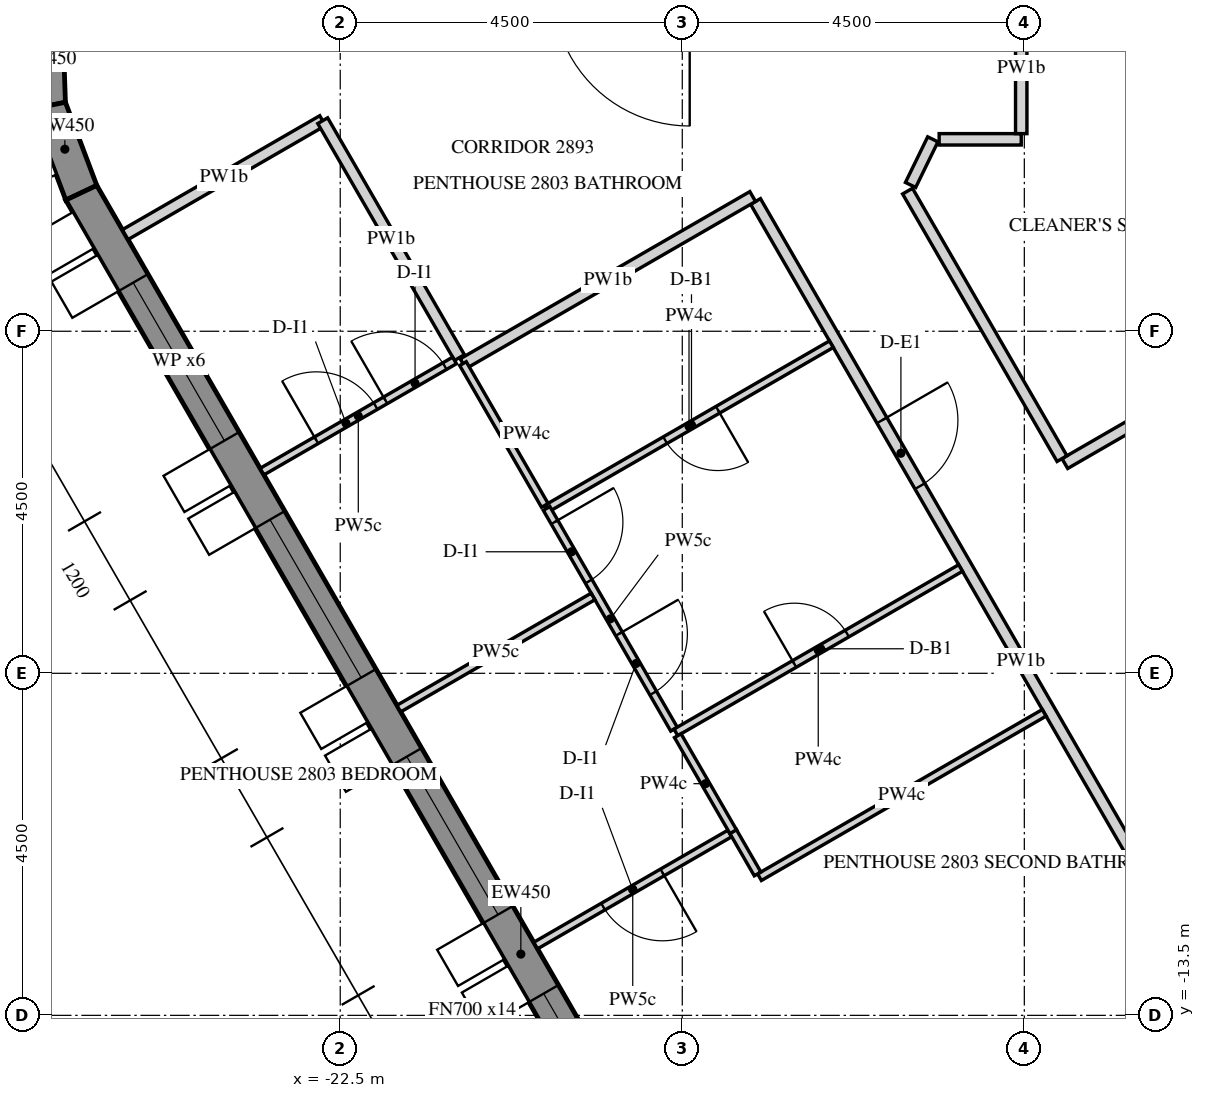
"""IFC4 building model, lengths in metres.
Left out: names, types, materials, properties, quantities, classifications, styles, units other than length and angle.
Written with IfcOpenShell. Run it as: python <this file> out.ifc"""

import sys

from ifc_helpers import new_model, si_unit, direction, frame, frame_2d, origin, place, context, subcontext, project, spatial, polyline, rectangle, outline, extrude, element, fill, save


model = new_model("IFC4")
c1 = context("Model", 3, precision=1e-05, world=origin(), true_north=direction((0.0, 1.0)))
c2 = subcontext(c1, "Body", "Model", "MODEL_VIEW")
j1 = project(units=[si_unit("LENGTHUNIT", "METRE"), si_unit("PLANEANGLEUNIT", "RADIAN")], contexts=[c1])
p1 = place(None, origin())
s1 = spatial("IfcSite", under=j1, at=p1, CompositionType="ELEMENT")
p2 = place(p1, origin())
s2 = spatial("IfcBuilding", under=s1, at=p2, CompositionType="ELEMENT")
p3 = place(p2, frame((0.0, 0.0, 361.2)))
s3 = spatial("IfcBuildingStorey", under=s2, at=p3, CompositionType="ELEMENT", Elevation=361.2)
p4 = place(p3, frame((-26.382, -0.309, -0.15), z_axis=(0.0, 0.0, 1.0), x_axis=(0.034887984255, -0.999391228976, 0.0)))
e1 = element("IfcWall", 1, at=p4, inside=s3, PredefinedType="SOLIDWALL", context=c2, shape_type="SweptSolid", body=[
    extrude(outline(polyline([(-0.037, -0.225), (1.261, -0.225), (1.188, 0.225), (0.037, 0.225), (-0.037, -0.225)])), origin(), (0.0, 0.0, 1.0), 3.9),
])
p5 = place(p3, frame((-26.339, -1.532, -0.15), z_axis=(0.0, 0.0, 1.0), x_axis=(0.353132996235, -0.935573132882, 0.0)))
e2 = element("IfcWall", 2, at=p5, inside=s3, PredefinedType="SOLIDWALL", context=c2, shape_type="SweptSolid", body=[
    extrude(outline(polyline([(-0.037, -0.225), (1.243, -0.225), (1.206, 0.225), (0.037, 0.225), (-0.037, -0.225)])), origin(), (0.0, 0.0, 1.0), 3.9),
])
p6 = place(p3, frame((-25.907, -2.678, -0.15), z_axis=(0.0, 0.0, 1.0), x_axis=(0.499997453958, -0.866026873738, 0.0)))
e3 = element("IfcWall", 3, at=p6, inside=s3, PredefinedType="SOLIDWALL", context=c2, shape_type="SweptSolid", body=[
    extrude(outline(polyline([(-0.018, -0.225), (23.152, -0.225), (23.11, 0.225), (0.018, 0.225), (-0.018, -0.225)])), origin(), (0.0, 0.0, 1.0), 3.9),
])
p7 = place(p6, frame((1.366, 0.0, 0.45)))
e4 = element("IfcOpeningElement", 4, at=p7, cuts=e3, PredefinedType="OPENING", context=c2, shape_type="SweptSolid", body=[
    extrude(rectangle(XDim=2.4, YDim=3.0, at=frame_2d((1.2, 1.5))), frame((0.0, 0.235, 0.0), z_axis=(0.0, -1.0, 0.0), x_axis=(1.0, 0.0, 0.0)), (0.0, 0.0, 1.0), 0.47),
])
p8 = place(p6, frame((4.966, 0.0, 0.45)))
e5 = element("IfcOpeningElement", 5, at=p8, cuts=e3, PredefinedType="OPENING", context=c2, shape_type="SweptSolid", body=[
    extrude(rectangle(XDim=2.4, YDim=3.0, at=frame_2d((1.2, 1.5))), frame((0.0, 0.235, 0.0), z_axis=(0.0, -1.0, 0.0), x_axis=(1.0, 0.0, 0.0)), (0.0, 0.0, 1.0), 0.47),
])
p9 = place(p6, frame((8.566, 0.0, 0.45)))
e6 = element("IfcOpeningElement", 6, at=p9, cuts=e3, PredefinedType="OPENING", context=c2, shape_type="SweptSolid", body=[
    extrude(rectangle(XDim=2.4, YDim=3.0, at=frame_2d((1.2, 1.5))), frame((0.0, 0.235, 0.0), z_axis=(0.0, -1.0, 0.0), x_axis=(1.0, 0.0, 0.0)), (0.0, 0.0, 1.0), 0.47),
])
p10 = place(p6, frame((12.166, 0.0, 0.45)))
e7 = element("IfcOpeningElement", 7, at=p10, cuts=e3, PredefinedType="OPENING", context=c2, shape_type="SweptSolid", body=[
    extrude(rectangle(XDim=2.4, YDim=3.0, at=frame_2d((1.2, 1.5))), frame((0.0, 0.235, 0.0), z_axis=(0.0, -1.0, 0.0), x_axis=(1.0, 0.0, 0.0)), (0.0, 0.0, 1.0), 0.47),
])
p11 = place(p6, frame((15.766, 0.0, 0.45)))
e8 = element("IfcOpeningElement", 8, at=p11, cuts=e3, PredefinedType="OPENING", context=c2, shape_type="SweptSolid", body=[
    extrude(rectangle(XDim=2.4, YDim=3.0, at=frame_2d((1.2, 1.5))), frame((0.0, 0.235, 0.0), z_axis=(0.0, -1.0, 0.0), x_axis=(1.0, 0.0, 0.0)), (0.0, 0.0, 1.0), 0.47),
])
p12 = place(p6, frame((19.366, 0.0, 0.45)))
e9 = element("IfcOpeningElement", 9, at=p12, cuts=e3, PredefinedType="OPENING", context=c2, shape_type="SweptSolid", body=[
    extrude(rectangle(XDim=2.4, YDim=3.0, at=frame_2d((1.2, 1.5))), frame((0.0, 0.235, 0.0), z_axis=(0.0, -1.0, 0.0), x_axis=(1.0, 0.0, 0.0)), (0.0, 0.0, 1.0), 0.47),
])
p13 = place(p3, frame((-17.036, -2.792, 0.0), z_axis=(0.0, 0.0, 1.0), x_axis=(0.500006428338, -0.86602169235, 0.0)))
e10 = element("IfcWall", 10, at=p13, inside=s3, PredefinedType="PARTITIONING", context=c2, shape_type="SweptSolid", body=[
    extrude(rectangle(XDim=13.966, YDim=0.15, at=frame_2d((6.983, 0.0))), origin(), (0.0, 0.0, 1.0), 2.82),
])
p14 = place(p13, frame((3.325, 0.0, 0.0)))
e11 = element("IfcOpeningElement", 11, at=p14, cuts=e10, PredefinedType="OPENING", context=c2, shape_type="SweptSolid", body=[
    extrude(rectangle(XDim=1.0, YDim=2.1, at=frame_2d((0.5, 1.05))), frame((0.0, 0.085, 0.0), z_axis=(0.0, -1.0, 0.0), x_axis=(1.0, 0.0, 0.0)), (0.0, 0.0, 1.0), 0.17),
])
p15 = place(p3, frame((-20.884, -4.927, 0.0), z_axis=(0.0, 0.0, 1.0), x_axis=(0.866032203192, 0.499988222896, 0.0)))
e12 = element("IfcWall", 12, at=p15, inside=s3, PredefinedType="PARTITIONING", context=c2, shape_type="SweptSolid", body=[
    extrude(rectangle(XDim=4.4, YDim=0.15, at=frame_2d((2.2, 0.0))), origin(), (0.0, 0.0, 1.0), 2.82),
])
p16 = place(p3, frame((-25.329, -3.229, 0.0), z_axis=(0.0, 0.0, 1.0), x_axis=(0.865999837459, 0.50004427956, 0.0)))
e13 = element("IfcWall", 13, at=p16, inside=s3, PredefinedType="PARTITIONING", context=c2, shape_type="SweptSolid", body=[
    extrude(rectangle(XDim=2.999, YDim=0.15, at=frame_2d((1.5, 0.0))), origin(), (0.0, 0.0, 1.0), 2.82),
])
p17 = place(p3, frame((-22.73, -1.73, 0.0), z_axis=(0.0, 0.0, 1.0), x_axis=(0.500027802648, -0.866009351323, 0.0)))
e14 = element("IfcWall", 14, at=p17, inside=s3, PredefinedType="PARTITIONING", context=c2, shape_type="SweptSolid", body=[
    extrude(rectangle(XDim=3.599, YDim=0.15, at=frame_2d((1.799, 0.0))), origin(), (0.0, 0.0, 1.0), 2.82),
])
p18 = place(p3, frame((-9.2, -4.066, 0.0), z_axis=(0.0, 0.0, 1.0), x_axis=(-0.866013608182, -0.500020430026, 0.0)))
e15 = element("IfcWall", 15, at=p18, inside=s3, PredefinedType="PARTITIONING", context=c2, shape_type="SweptSolid", body=[
    extrude(rectangle(XDim=4.35, YDim=0.15, at=frame_2d((2.175, 0.0))), origin(), (0.0, 0.0, 1.0), 2.82),
])
p19 = place(p18, frame((1.725, 0.0, 0.0)))
e16 = element("IfcOpeningElement", 16, at=p19, cuts=e15, PredefinedType="OPENING", context=c2, shape_type="SweptSolid", body=[
    extrude(rectangle(XDim=0.9, YDim=2.1, at=frame_2d((0.45, 1.05))), frame((0.0, 0.085, 0.0), z_axis=(0.0, -1.0, 0.0), x_axis=(1.0, 0.0, 0.0)), (0.0, 0.0, 1.0), 0.17),
])
p20 = place(p3, frame((-13.004, -6.176, 0.0), z_axis=(0.0, 0.0, 1.0), x_axis=(-0.500022342669, 0.866012503854, 0.0)))
e17 = element("IfcWall", 17, at=p20, inside=s3, PredefinedType="PARTITIONING", context=c2, shape_type="SweptSolid", body=[
    extrude(rectangle(XDim=4.064, YDim=0.15, at=frame_2d((2.032, 0.0))), origin(), (0.0, 0.0, 1.0), 2.82),
])
p21 = place(p3, frame((-14.997, -2.575, 0.0), z_axis=(0.0, 0.0, 1.0), x_axis=(0.438416427913, 0.898771959808, 0.0)))
e18 = element("IfcWall", 18, at=p21, inside=s3, PredefinedType="PARTITIONING", context=c2, shape_type="SweptSolid", body=[
    extrude(rectangle(XDim=0.668, YDim=0.15, at=frame_2d((0.334, 0.0))), origin(), (0.0, 0.0, 1.0), 2.82),
])
p22 = place(p3, frame((-14.62, -1.975, 0.0), z_axis=(0.0, 0.0, 1.0), x_axis=(1.0, 0.0, 0.0)))
e19 = element("IfcWall", 19, at=p22, inside=s3, PredefinedType="PARTITIONING", context=c2, shape_type="SweptSolid", body=[
    extrude(rectangle(XDim=1.08, YDim=0.15, at=frame_2d((0.54, 0.0))), origin(), (0.0, 0.0, 1.0), 2.82),
])
p23 = place(p3, frame((-13.541, -1.9, 0.0), z_axis=(0.0, 0.0, 1.0), x_axis=(0.0, 1.0, 0.0)))
e20 = element("IfcWall", 20, at=p23, inside=s3, PredefinedType="PARTITIONING", context=c2, shape_type="SweptSolid", body=[
    extrude(rectangle(XDim=1.725, YDim=0.15, at=frame_2d((0.862, 0.0))), origin(), (0.0, 0.0, 1.0), 2.82),
])
p24 = place(p3, frame((-17.374, -11.107, 0.0), z_axis=(0.0, 0.0, 1.0), x_axis=(-0.866024349092, -0.500001826776, 0.0)))
e21 = element("IfcWall", 21, at=p24, inside=s3, PredefinedType="PARTITIONING", context=c2, shape_type="SweptSolid", body=[
    extrude(rectangle(XDim=2.95, YDim=0.1, at=frame_2d((1.475, 0.0))), origin(), (0.0, 0.0, 1.0), 2.82),
])
p25 = place(p24, frame((1.025, 0.0, 0.0)))
e22 = element("IfcOpeningElement", 22, at=p25, cuts=e21, PredefinedType="OPENING", context=c2, shape_type="SweptSolid", body=[
    extrude(rectangle(XDim=0.9, YDim=2.1, at=frame_2d((0.45, 1.05))), frame((0.0, 0.06, 0.0), z_axis=(0.0, -1.0, 0.0), x_axis=(1.0, 0.0, 0.0)), (0.0, 0.0, 1.0), 0.12),
])
p26 = place(p3, frame((-13.239, -9.52, 0.0), z_axis=(0.0, 0.0, 1.0), x_axis=(-0.866018262327, -0.500012369163, 0.0)))
e23 = element("IfcWall", 23, at=p26, inside=s3, PredefinedType="PARTITIONING", context=c2, shape_type="SweptSolid", body=[
    extrude(rectangle(XDim=4.325, YDim=0.1, at=frame_2d((2.163, 0.0))), origin(), (0.0, 0.0, 1.0), 2.82),
])
p27 = place(p3, frame((-17.009, -11.639, 0.0), z_axis=(0.0, 0.0, 1.0), x_axis=(-0.499962526042, 0.866047038303, 0.0)))
e24 = element("IfcWall", 24, at=p27, inside=s3, PredefinedType="PARTITIONING", context=c2, shape_type="SweptSolid", body=[
    extrude(rectangle(XDim=0.646, YDim=0.1, at=frame_2d((0.323, 0.0))), origin(), (0.0, 0.0, 1.0), 2.82),
])
p28 = place(p3, frame((-16.039, -4.67, 0.0), z_axis=(0.0, 0.0, 1.0), x_axis=(-0.86604270489, -0.499970032409, 0.0)))
e25 = element("IfcWall", 25, at=p28, inside=s3, PredefinedType="PARTITIONING", context=c2, shape_type="SweptSolid", body=[
    extrude(rectangle(XDim=4.325, YDim=0.1, at=frame_2d((2.163, 0.0))), origin(), (0.0, 0.0, 1.0), 2.82),
])
p29 = place(p28, frame((1.725, 0.0, 0.0)))
e26 = element("IfcOpeningElement", 26, at=p29, cuts=e25, PredefinedType="OPENING", context=c2, shape_type="SweptSolid", body=[
    extrude(rectangle(XDim=0.8, YDim=2.1, at=frame_2d((0.4, 1.05))), frame((0.0, 0.06, 0.0), z_axis=(0.0, -1.0, 0.0), x_axis=(1.0, 0.0, 0.0)), (0.0, 0.0, 1.0), 0.12),
])
p30 = place(p3, frame((-19.785, -6.831, 0.0), z_axis=(0.0, 0.0, 1.0), x_axis=(0.499982885398, -0.866035284679, 0.0)))
e27 = element("IfcWall", 27, at=p30, inside=s3, PredefinedType="PARTITIONING", context=c2, shape_type="SweptSolid", body=[
    extrude(rectangle(XDim=3.354, YDim=0.1, at=frame_2d((1.677, 0.0))), origin(), (0.0, 0.0, 1.0), 2.82),
])
p31 = place(p30, frame((0.208, 0.0, 0.0)))
e28 = element("IfcOpeningElement", 28, at=p31, cuts=e27, PredefinedType="OPENING", context=c2, shape_type="SweptSolid", body=[
    extrude(rectangle(XDim=0.9, YDim=2.1, at=frame_2d((0.45, 1.05))), frame((0.0, 0.06, 0.0), z_axis=(0.0, -1.0, 0.0), x_axis=(1.0, 0.0, 0.0)), (0.0, 0.0, 1.0), 0.12),
])
p32 = place(p30, frame((1.905, 0.0, 0.0)))
e29 = element("IfcOpeningElement", 29, at=p32, cuts=e27, PredefinedType="OPENING", context=c2, shape_type="SweptSolid", body=[
    extrude(rectangle(XDim=0.9, YDim=2.1, at=frame_2d((0.45, 1.05))), frame((0.0, 0.06, 0.0), z_axis=(0.0, -1.0, 0.0), x_axis=(1.0, 0.0, 0.0)), (0.0, 0.0, 1.0), 0.12),
])
p33 = place(p3, frame((-18.084, -9.777, 0.0), z_axis=(0.0, 0.0, 1.0), x_axis=(0.866018262327, 0.500012369163, 0.0)))
e30 = element("IfcWall", 30, at=p33, inside=s3, PredefinedType="PARTITIONING", context=c2, shape_type="SweptSolid", body=[
    extrude(rectangle(XDim=4.325, YDim=0.1, at=frame_2d((2.163, 0.0))), origin(), (0.0, 0.0, 1.0), 2.82),
])
p34 = place(p33, frame((1.8, 0.0, 0.0)))
e31 = element("IfcOpeningElement", 31, at=p34, cuts=e30, PredefinedType="OPENING", context=c2, shape_type="SweptSolid", body=[
    extrude(rectangle(XDim=0.8, YDim=2.1, at=frame_2d((0.4, 1.05))), frame((0.0, 0.06, 0.0), z_axis=(0.0, -1.0, 0.0), x_axis=(1.0, 0.0, 0.0)), (0.0, 0.0, 1.0), 0.12),
])
p35 = place(p3, frame((-20.885, -4.926, 0.0), z_axis=(0.0, 0.0, 1.0), x_axis=(0.500039660922, -0.86600250433, 0.0)))
e32 = element("IfcWall", 32, at=p35, inside=s3, PredefinedType="PARTITIONING", context=c2, shape_type="SweptSolid", body=[
    extrude(rectangle(XDim=2.154, YDim=0.1, at=frame_2d((1.077, 0.0))), origin(), (0.0, 0.0, 1.0), 2.82),
])
p36 = place(p3, frame((-23.529, -6.346, 0.0), z_axis=(0.0, 0.0, 1.0), x_axis=(0.866025730634, 0.499999433879, 0.0)))
e33 = element("IfcWall", 33, at=p36, inside=s3, PredefinedType="PARTITIONING", context=c2, shape_type="SweptSolid", body=[
    extrude(rectangle(XDim=2.925, YDim=0.1, at=frame_2d((1.462, 0.0))), origin(), (0.0, 0.0, 1.0), 2.82),
])
p37 = place(p36, frame((1.875, 0.0, 0.0)))
e34 = element("IfcOpeningElement", 34, at=p37, cuts=e33, PredefinedType="OPENING", context=c2, shape_type="SweptSolid", body=[
    extrude(rectangle(XDim=0.9, YDim=2.1, at=frame_2d((0.45, 1.05))), frame((0.0, 0.06, 0.0), z_axis=(0.0, -1.0, 0.0), x_axis=(1.0, 0.0, 0.0)), (0.0, 0.0, 1.0), 0.12),
])
p38 = place(p36, frame((0.825, 0.0, 0.0)))
e35 = element("IfcOpeningElement", 35, at=p38, cuts=e33, PredefinedType="OPENING", context=c2, shape_type="SweptSolid", body=[
    extrude(rectangle(XDim=0.9, YDim=2.1, at=frame_2d((0.45, 1.05))), frame((0.0, 0.06, 0.0), z_axis=(0.0, -1.0, 0.0), x_axis=(1.0, 0.0, 0.0)), (0.0, 0.0, 1.0), 0.12),
])
p39 = place(p3, frame((-21.729, -9.464, 0.0), z_axis=(0.0, 0.0, 1.0), x_axis=(0.866003658127, 0.500037662692, 0.0)))
e36 = element("IfcWall", 36, at=p39, inside=s3, PredefinedType="PARTITIONING", context=c2, shape_type="SweptSolid", body=[
    extrude(rectangle(XDim=2.95, YDim=0.1, at=frame_2d((1.475, 0.0))), origin(), (0.0, 0.0, 1.0), 2.82),
])
p40 = place(p3, frame((-17.33, -11.083, 0.0), z_axis=(0.0, 0.0, 1.0), x_axis=(-0.499920521767, 0.866071285701, 0.0)))
e37 = element("IfcWall", 37, at=p40, inside=s3, PredefinedType="PARTITIONING", context=c2, shape_type="SweptSolid", body=[
    extrude(rectangle(XDim=1.458, YDim=0.1, at=frame_2d((0.729, 0.0))), origin(), (0.0, 0.0, 1.0), 2.82),
])
p41 = place(p7, frame((0.0, 0.155, 0.0)))
e38 = element("IfcWindow", 38, at=p41, inside=s3, PartitioningType="DOUBLE_PANEL_VERTICAL", PredefinedType="WINDOW", context=c2, shape_type="SweptSolid", body=[
    extrude(rectangle(XDim=2.4, YDim=3.0, at=frame_2d((1.2, 1.5))), frame((0.0, 0.03, 0.0), z_axis=(0.0, -1.0, 0.0), x_axis=(1.0, 0.0, 0.0)), (0.0, 0.0, 1.0), 0.06),
])
fill(e4, e38)
p42 = place(p8, frame((0.0, 0.155, 0.0)))
e39 = element("IfcWindow", 39, at=p42, inside=s3, PartitioningType="DOUBLE_PANEL_VERTICAL", PredefinedType="WINDOW", context=c2, shape_type="SweptSolid", body=[
    extrude(rectangle(XDim=2.4, YDim=3.0, at=frame_2d((1.2, 1.5))), frame((0.0, 0.03, 0.0), z_axis=(0.0, -1.0, 0.0), x_axis=(1.0, 0.0, 0.0)), (0.0, 0.0, 1.0), 0.06),
])
fill(e5, e39)
p43 = place(p9, frame((0.0, 0.155, 0.0)))
e40 = element("IfcWindow", 40, at=p43, inside=s3, PartitioningType="DOUBLE_PANEL_VERTICAL", PredefinedType="WINDOW", context=c2, shape_type="SweptSolid", body=[
    extrude(rectangle(XDim=2.4, YDim=3.0, at=frame_2d((1.2, 1.5))), frame((0.0, 0.03, 0.0), z_axis=(0.0, -1.0, 0.0), x_axis=(1.0, 0.0, 0.0)), (0.0, 0.0, 1.0), 0.06),
])
fill(e6, e40)
p44 = place(p10, frame((0.0, 0.155, 0.0)))
e41 = element("IfcWindow", 41, at=p44, inside=s3, PartitioningType="DOUBLE_PANEL_VERTICAL", PredefinedType="WINDOW", context=c2, shape_type="SweptSolid", body=[
    extrude(rectangle(XDim=2.4, YDim=3.0, at=frame_2d((1.2, 1.5))), frame((0.0, 0.03, 0.0), z_axis=(0.0, -1.0, 0.0), x_axis=(1.0, 0.0, 0.0)), (0.0, 0.0, 1.0), 0.06),
])
fill(e7, e41)
p45 = place(p14, origin())
e42 = element("IfcDoor", 42, at=p45, inside=s3, OperationType="SINGLE_SWING_RIGHT", PredefinedType="DOOR", context=c2, shape_type="SweptSolid", body=[
    extrude(rectangle(XDim=1.0, YDim=2.1, at=frame_2d((0.5, 1.05))), frame((0.0, 0.025, 0.0), z_axis=(0.0, -1.0, 0.0), x_axis=(1.0, 0.0, 0.0)), (0.0, 0.0, 1.0), 0.05),
])
fill(e11, e42)
p46 = place(p29, origin())
e43 = element("IfcDoor", 43, at=p46, inside=s3, OperationType="SINGLE_SWING_RIGHT", PredefinedType="DOOR", context=c2, shape_type="SweptSolid", body=[
    extrude(rectangle(XDim=0.8, YDim=2.1, at=frame_2d((0.4, 1.05))), frame((0.0, 0.025, 0.0), z_axis=(0.0, -1.0, 0.0), x_axis=(1.0, 0.0, 0.0)), (0.0, 0.0, 1.0), 0.05),
])
fill(e26, e43)
p47 = place(p31, origin())
e44 = element("IfcDoor", 44, at=p47, inside=s3, OperationType="SINGLE_SWING_LEFT", PredefinedType="DOOR", context=c2, shape_type="SweptSolid", body=[
    extrude(rectangle(XDim=0.9, YDim=2.1, at=frame_2d((0.45, 1.05))), frame((0.0, 0.025, 0.0), z_axis=(0.0, -1.0, 0.0), x_axis=(1.0, 0.0, 0.0)), (0.0, 0.0, 1.0), 0.05),
])
fill(e28, e44)
p48 = place(p37, origin())
e45 = element("IfcDoor", 45, at=p48, inside=s3, OperationType="SINGLE_SWING_RIGHT", PredefinedType="DOOR", context=c2, shape_type="SweptSolid", body=[
    extrude(rectangle(XDim=0.9, YDim=2.1, at=frame_2d((0.45, 1.05))), frame((0.0, 0.025, 0.0), z_axis=(0.0, -1.0, 0.0), x_axis=(1.0, 0.0, 0.0)), (0.0, 0.0, 1.0), 0.05),
])
fill(e34, e45)
p49 = place(p38, origin())
e46 = element("IfcDoor", 46, at=p49, inside=s3, OperationType="SINGLE_SWING_RIGHT", PredefinedType="DOOR", context=c2, shape_type="SweptSolid", body=[
    extrude(rectangle(XDim=0.9, YDim=2.1, at=frame_2d((0.45, 1.05))), frame((0.0, 0.025, 0.0), z_axis=(0.0, -1.0, 0.0), x_axis=(1.0, 0.0, 0.0)), (0.0, 0.0, 1.0), 0.05),
])
fill(e35, e46)
p50 = place(p32, origin())
e47 = element("IfcDoor", 47, at=p50, inside=s3, OperationType="SINGLE_SWING_RIGHT", PredefinedType="DOOR", context=c2, shape_type="SweptSolid", body=[
    extrude(rectangle(XDim=0.9, YDim=2.1, at=frame_2d((0.45, 1.05))), frame((0.0, 0.025, 0.0), z_axis=(0.0, -1.0, 0.0), x_axis=(1.0, 0.0, 0.0)), (0.0, 0.0, 1.0), 0.05),
])
fill(e29, e47)
p51 = place(p34, origin())
e48 = element("IfcDoor", 48, at=p51, inside=s3, OperationType="SINGLE_SWING_LEFT", PredefinedType="DOOR", context=c2, shape_type="SweptSolid", body=[
    extrude(rectangle(XDim=0.8, YDim=2.1, at=frame_2d((0.4, 1.05))), frame((0.0, 0.025, 0.0), z_axis=(0.0, -1.0, 0.0), x_axis=(1.0, 0.0, 0.0)), (0.0, 0.0, 1.0), 0.05),
])
fill(e31, e48)
p52 = place(p25, origin())
e49 = element("IfcDoor", 49, at=p52, inside=s3, OperationType="SINGLE_SWING_LEFT", PredefinedType="DOOR", context=c2, shape_type="SweptSolid", body=[
    extrude(rectangle(XDim=0.9, YDim=2.1, at=frame_2d((0.45, 1.05))), frame((0.0, 0.025, 0.0), z_axis=(0.0, -1.0, 0.0), x_axis=(1.0, 0.0, 0.0)), (0.0, 0.0, 1.0), 0.05),
])
fill(e22, e49)
save(model, sys.argv[1])
